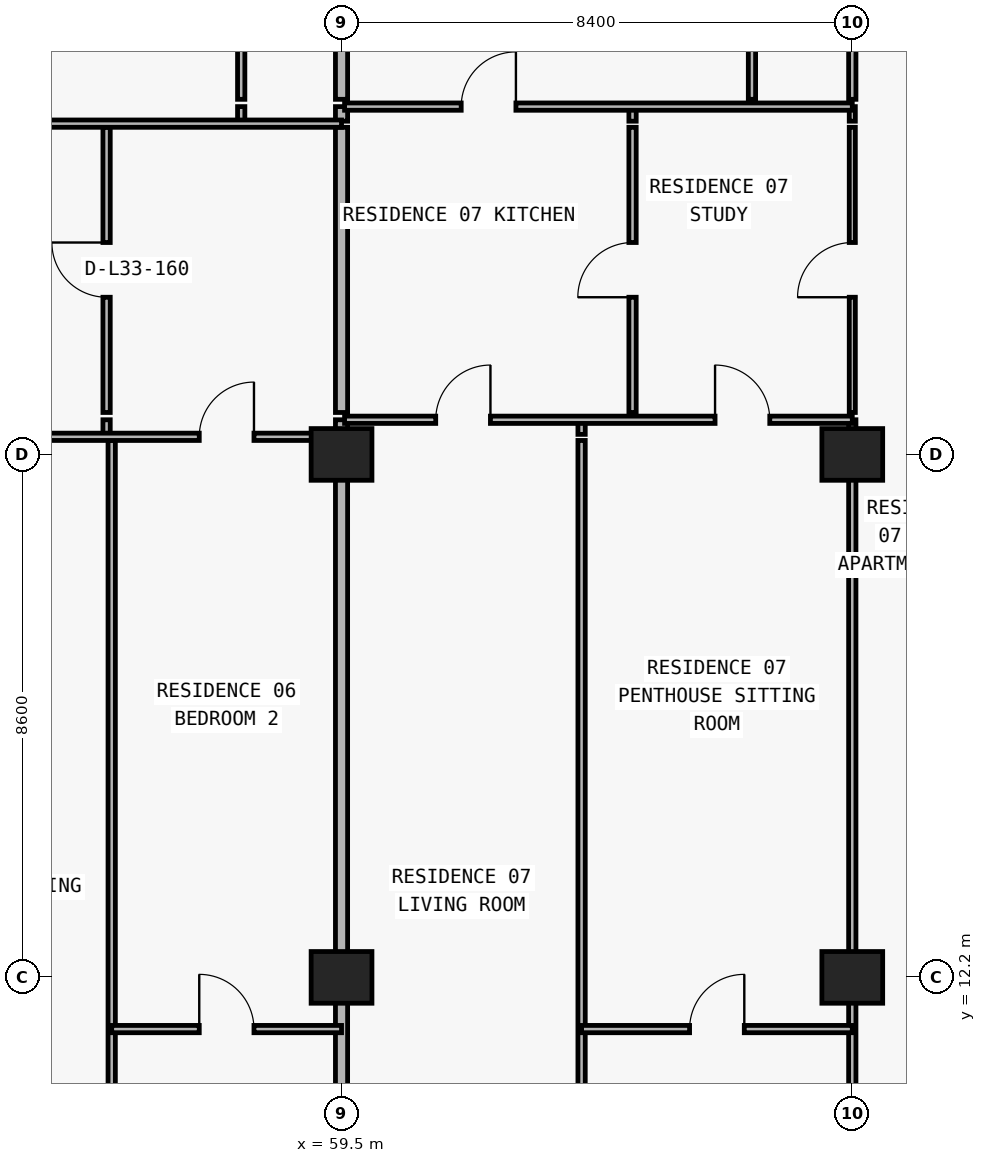
"""IFC4 building model, lengths in metres.
Left out: names, types, materials, properties, quantities, classifications, styles, units other than length and angle.
Written with IfcOpenShell. Run it as: python <this file> out.ifc"""

import sys

from ifc_helpers import new_model, si_unit, direction, frame, frame_2d, origin, origin_2d, place, context, subcontext, project, spatial, rectangle, extrude, element, fill, save


model = new_model("IFC4")
c1 = context("Model", 3, precision=1e-05, world=origin(), true_north=direction((0.0, 1.0)))
c2 = subcontext(c1, "Body", "Model", "MODEL_VIEW")
j1 = project(units=[si_unit("LENGTHUNIT", "METRE"), si_unit("PLANEANGLEUNIT", "RADIAN")], contexts=[c1])
p1 = place(None, origin())
s1 = spatial("IfcSite", under=j1, at=p1, CompositionType="ELEMENT")
p2 = place(p1, origin())
s2 = spatial("IfcBuilding", under=s1, at=p2, CompositionType="ELEMENT")
p3 = place(p2, frame((0.0, 0.0, 122.4)))
s3 = spatial("IfcBuildingStorey", under=s2, at=p3, CompositionType="ELEMENT", Elevation=122.4)
for number, where, z_axis, x_axis in (
    (1, (59.5, 12.2, 0.0), (0.0, 0.0, 1.0), (1.0, 0.0, 0.0)),
    (2, (67.9, 12.2, 0.0), (0.0, 0.0, 1.0), (1.0, 0.0, 0.0)),
    (3, (59.5, 20.8, 0.0), (0.0, 0.0, 1.0), (1.0, 0.0, 0.0)),
    (4, (67.9, 20.8, 0.0), (0.0, 0.0, 1.0), (1.0, 0.0, 0.0)),
):
    element("IfcColumn", number, at=place(p3, frame(where, z_axis=z_axis, x_axis=x_axis)), inside=s3, PredefinedType="COLUMN", context=c2, shape_type="SweptSolid", body=[
        extrude(rectangle(XDim=1.0, YDim=0.85, at=origin_2d()), origin(), (0.0, 0.0, 1.0), 3.05),
    ])
p4 = place(p3, frame((55.636, 21.13, 0.0), z_axis=(0.0, 0.0, 1.0), x_axis=(0.0, 1.0, 0.0)))
e5 = element("IfcWall", 5, at=p4, inside=s3, PredefinedType="PARTITIONING", context=c2, shape_type="SweptSolid", body=[
    extrude(rectangle(XDim=0.24, YDim=0.12, at=frame_2d((0.12, 0.0))), origin(), (0.0, 0.0, 1.0), 3.05),
])
p5 = place(p3, frame((55.636, 21.49, 0.0), z_axis=(0.0, 0.0, 1.0), x_axis=(0.0, 1.0, 0.0)))
e6 = element("IfcWall", 6, at=p5, inside=s3, PredefinedType="PARTITIONING", context=c2, shape_type="SweptSolid", body=[
    extrude(rectangle(XDim=4.69, YDim=0.12, at=frame_2d((2.345, 0.0))), origin(), (0.0, 0.0, 1.0), 3.05),
])
p6 = place(p5, frame((1.895, 0.0, 0.0)))
e7 = element("IfcOpeningElement", 7, at=p6, cuts=e6, PredefinedType="OPENING", context=c2, shape_type="SweptSolid", body=[
    extrude(rectangle(XDim=0.9, YDim=2.15, at=frame_2d((0.45, 1.075))), frame((0.0, 0.07, 0.0), z_axis=(0.0, -1.0, 0.0), x_axis=(1.0, 0.0, 0.0)), (0.0, 0.0, 1.0), 0.14),
])
p7 = place(p3, frame((55.72, 8.84, 0.0), z_axis=(0.0, 0.0, 1.0), x_axis=(0.0, 1.0, 0.0)))
e8 = element("IfcWall", 8, at=p7, inside=s3, PredefinedType="PARTITIONING", context=c2, shape_type="SweptSolid", body=[
    extrude(rectangle(XDim=12.19, YDim=0.12, at=frame_2d((6.095, 0.0))), origin(), (0.0, 0.0, 1.0), 3.05),
])
p8 = place(p3, frame((57.85, 26.28, 0.0), z_axis=(0.0, 0.0, 1.0), x_axis=(0.0, 1.0, 0.0)))
e9 = element("IfcWall", 9, at=p8, inside=s3, PredefinedType="PARTITIONING", context=c2, shape_type="SweptSolid", body=[
    extrude(rectangle(XDim=0.24, YDim=0.12, at=frame_2d((0.12, 0.0))), origin(), (0.0, 0.0, 1.0), 3.05),
])
p9 = place(p3, frame((57.85, 26.64, 0.0), z_axis=(0.0, 0.0, 1.0), x_axis=(0.0, 1.0, 0.0)))
e10 = element("IfcWall", 10, at=p9, inside=s3, PredefinedType="PARTITIONING", context=c2, shape_type="SweptSolid", body=[
    extrude(rectangle(XDim=8.06, YDim=0.12, at=frame_2d((4.03, 0.0))), origin(), (0.0, 0.0, 1.0), 3.05),
])
p10 = place(p9, frame((3.755, 0.0, 0.0)))
e11 = element("IfcOpeningElement", 11, at=p10, cuts=e10, PredefinedType="OPENING", context=c2, shape_type="SweptSolid", body=[
    extrude(rectangle(XDim=0.85, YDim=2.1, at=frame_2d((0.425, 1.05))), frame((0.0, 0.07, 0.0), z_axis=(0.0, -1.0, 0.0), x_axis=(1.0, 0.0, 0.0)), (0.0, 0.0, 1.0), 0.14),
])
p11 = place(p3, frame((59.5, 8.84, 0.0), z_axis=(0.0, 0.0, 1.0), x_axis=(0.0, 1.0, 0.0)))
e12 = element("IfcWall", 12, at=p11, inside=s3, PredefinedType="PARTITIONING", context=c2, shape_type="SweptSolid", body=[
    extrude(rectangle(XDim=12.19, YDim=0.2, at=frame_2d((6.095, 0.0))), origin(), (0.0, 0.0, 1.0), 2.174),
])
p12 = place(p3, frame((59.5, 21.13, 0.0), z_axis=(0.0, 0.0, 1.0), x_axis=(0.0, 1.0, 0.0)))
e13 = element("IfcWall", 13, at=p12, inside=s3, PredefinedType="PARTITIONING", context=c2, shape_type="SweptSolid", body=[
    extrude(rectangle(XDim=0.24, YDim=0.2, at=frame_2d((0.12, 0.0))), origin(), (0.0, 0.0, 1.0), 2.174),
])
p13 = place(p3, frame((59.5, 21.49, 0.0), z_axis=(0.0, 0.0, 1.0), x_axis=(0.0, 1.0, 0.0)))
e14 = element("IfcWall", 14, at=p13, inside=s3, PredefinedType="PARTITIONING", context=c2, shape_type="SweptSolid", body=[
    extrude(rectangle(XDim=4.69, YDim=0.2, at=frame_2d((2.345, 0.0))), origin(), (0.0, 0.0, 1.0), 2.174),
])
p14 = place(p3, frame((59.5, 26.28, 0.0), z_axis=(0.0, 0.0, 1.0), x_axis=(0.0, 1.0, 0.0)))
e15 = element("IfcWall", 15, at=p14, inside=s3, PredefinedType="PARTITIONING", context=c2, shape_type="SweptSolid", body=[
    extrude(rectangle(XDim=0.24, YDim=0.2, at=frame_2d((0.12, 0.0))), origin(), (0.0, 0.0, 1.0), 2.174),
])
p15 = place(p3, frame((59.5, 26.64, 0.0), z_axis=(0.0, 0.0, 1.0), x_axis=(0.0, 1.0, 0.0)))
e16 = element("IfcWall", 16, at=p15, inside=s3, PredefinedType="PARTITIONING", context=c2, shape_type="SweptSolid", body=[
    extrude(rectangle(XDim=8.06, YDim=0.2, at=frame_2d((4.03, 0.0))), origin(), (0.0, 0.0, 1.0), 2.174),
])
p16 = place(p3, frame((63.448, 8.84, 0.0), z_axis=(0.0, 0.0, 1.0), x_axis=(0.0, 1.0, 0.0)))
e17 = element("IfcWall", 17, at=p16, inside=s3, PredefinedType="PARTITIONING", context=c2, shape_type="SweptSolid", body=[
    extrude(rectangle(XDim=12.19, YDim=0.12, at=frame_2d((6.095, 0.0))), origin(), (0.0, 0.0, 1.0), 3.05),
])
p17 = place(p3, frame((63.448, 21.13, 0.0), z_axis=(0.0, 0.0, 1.0), x_axis=(0.0, 1.0, 0.0)))
e18 = element("IfcWall", 18, at=p17, inside=s3, PredefinedType="PARTITIONING", context=c2, shape_type="SweptSolid", body=[
    extrude(rectangle(XDim=0.24, YDim=0.12, at=frame_2d((0.12, 0.0))), origin(), (0.0, 0.0, 1.0), 3.05),
])
p18 = place(p3, frame((64.286, 21.49, 0.0), z_axis=(0.0, 0.0, 1.0), x_axis=(0.0, 1.0, 0.0)))
e19 = element("IfcWall", 19, at=p18, inside=s3, PredefinedType="PARTITIONING", context=c2, shape_type="SweptSolid", body=[
    extrude(rectangle(XDim=4.69, YDim=0.12, at=frame_2d((2.345, 0.0))), origin(), (0.0, 0.0, 1.0), 3.05),
])
p19 = place(p18, frame((1.895, 0.0, 0.0)))
e20 = element("IfcOpeningElement", 20, at=p19, cuts=e19, PredefinedType="OPENING", context=c2, shape_type="SweptSolid", body=[
    extrude(rectangle(XDim=0.9, YDim=2.15, at=frame_2d((0.45, 1.075))), frame((0.0, 0.07, 0.0), z_axis=(0.0, -1.0, 0.0), x_axis=(1.0, 0.0, 0.0)), (0.0, 0.0, 1.0), 0.14),
])
p20 = place(p3, frame((64.286, 26.28, 0.0), z_axis=(0.0, 0.0, 1.0), x_axis=(0.0, 1.0, 0.0)))
e21 = element("IfcWall", 21, at=p20, inside=s3, PredefinedType="PARTITIONING", context=c2, shape_type="SweptSolid", body=[
    extrude(rectangle(XDim=0.24, YDim=0.12, at=frame_2d((0.12, 0.0))), origin(), (0.0, 0.0, 1.0), 3.05),
])
p21 = place(p3, frame((66.25, 26.64, 0.0), z_axis=(0.0, 0.0, 1.0), x_axis=(0.0, 1.0, 0.0)))
e22 = element("IfcWall", 22, at=p21, inside=s3, PredefinedType="PARTITIONING", context=c2, shape_type="SweptSolid", body=[
    extrude(rectangle(XDim=8.06, YDim=0.12, at=frame_2d((4.03, 0.0))), origin(), (0.0, 0.0, 1.0), 3.05),
])
p22 = place(p21, frame((3.755, 0.0, 0.0)))
e23 = element("IfcOpeningElement", 23, at=p22, cuts=e22, PredefinedType="OPENING", context=c2, shape_type="SweptSolid", body=[
    extrude(rectangle(XDim=0.85, YDim=2.1, at=frame_2d((0.425, 1.05))), frame((0.0, 0.07, 0.0), z_axis=(0.0, -1.0, 0.0), x_axis=(1.0, 0.0, 0.0)), (0.0, 0.0, 1.0), 0.14),
])
p23 = place(p3, frame((67.9, 8.84, 0.0), z_axis=(0.0, 0.0, 1.0), x_axis=(0.0, 1.0, 0.0)))
e24 = element("IfcWall", 24, at=p23, inside=s3, PredefinedType="PARTITIONING", context=c2, shape_type="SweptSolid", body=[
    extrude(rectangle(XDim=12.19, YDim=0.12, at=frame_2d((6.095, 0.0))), origin(), (0.0, 0.0, 1.0), 2.174),
])
p24 = place(p3, frame((67.9, 21.13, 0.0), z_axis=(0.0, 0.0, 1.0), x_axis=(0.0, 1.0, 0.0)))
e25 = element("IfcWall", 25, at=p24, inside=s3, PredefinedType="PARTITIONING", context=c2, shape_type="SweptSolid", body=[
    extrude(rectangle(XDim=0.24, YDim=0.12, at=frame_2d((0.12, 0.0))), origin(), (0.0, 0.0, 1.0), 2.174),
])
p25 = place(p3, frame((67.9, 21.49, 0.0), z_axis=(0.0, 0.0, 1.0), x_axis=(0.0, 1.0, 0.0)))
e26 = element("IfcWall", 26, at=p25, inside=s3, PredefinedType="MOVABLE", context=c2, shape_type="SweptSolid", body=[
    extrude(rectangle(XDim=4.69, YDim=0.1, at=frame_2d((2.345, 0.0))), origin(), (0.0, 0.0, 1.0), 2.174),
])
p26 = place(p25, frame((1.895, 0.0, 0.0)))
e27 = element("IfcOpeningElement", 27, at=p26, cuts=e26, PredefinedType="OPENING", context=c2, shape_type="SweptSolid", body=[
    extrude(rectangle(XDim=0.9, YDim=2.124, at=frame_2d((0.45, 1.062))), frame((0.0, 0.06, 0.0), z_axis=(0.0, -1.0, 0.0), x_axis=(1.0, 0.0, 0.0)), (0.0, 0.0, 1.0), 0.12),
])
p27 = place(p3, frame((67.9, 26.28, 0.0), z_axis=(0.0, 0.0, 1.0), x_axis=(0.0, 1.0, 0.0)))
e28 = element("IfcWall", 28, at=p27, inside=s3, PredefinedType="MOVABLE", context=c2, shape_type="SweptSolid", body=[
    extrude(rectangle(XDim=0.24, YDim=0.1, at=frame_2d((0.12, 0.0))), origin(), (0.0, 0.0, 1.0), 2.174),
])
p28 = place(p3, frame((67.9, 26.64, 0.0), z_axis=(0.0, 0.0, 1.0), x_axis=(0.0, 1.0, 0.0)))
e29 = element("IfcWall", 29, at=p28, inside=s3, PredefinedType="PARTITIONING", context=c2, shape_type="SweptSolid", body=[
    extrude(rectangle(XDim=8.06, YDim=0.12, at=frame_2d((4.03, 0.0))), origin(), (0.0, 0.0, 1.0), 2.174),
])
p29 = place(p3, frame((55.72, 11.35, 0.0), z_axis=(0.0, 0.0, 1.0), x_axis=(1.0, 0.0, 0.0)))
e30 = element("IfcWall", 30, at=p29, inside=s3, PredefinedType="PARTITIONING", context=c2, shape_type="SweptSolid", body=[
    extrude(rectangle(XDim=3.78, YDim=0.12, at=frame_2d((1.89, 0.0))), origin(), (0.0, 0.0, 1.0), 3.05),
])
p30 = place(p29, frame((1.44, 0.0, 0.0)))
e31 = element("IfcOpeningElement", 31, at=p30, cuts=e30, PredefinedType="OPENING", context=c2, shape_type="SweptSolid", body=[
    extrude(rectangle(XDim=0.9, YDim=2.15, at=frame_2d((0.45, 1.075))), frame((0.0, 0.07, 0.0), z_axis=(0.0, -1.0, 0.0), x_axis=(1.0, 0.0, 0.0)), (0.0, 0.0, 1.0), 0.14),
])
p31 = place(p3, frame((63.448, 11.35, 0.0), z_axis=(0.0, 0.0, 1.0), x_axis=(1.0, 0.0, 0.0)))
e32 = element("IfcWall", 32, at=p31, inside=s3, PredefinedType="PARTITIONING", context=c2, shape_type="SweptSolid", body=[
    extrude(rectangle(XDim=4.452, YDim=0.12, at=frame_2d((2.226, 0.0))), origin(), (0.0, 0.0, 1.0), 3.05),
])
p32 = place(p31, frame((1.776, 0.0, 0.0)))
e33 = element("IfcOpeningElement", 33, at=p32, cuts=e32, PredefinedType="OPENING", context=c2, shape_type="SweptSolid", body=[
    extrude(rectangle(XDim=0.9, YDim=2.15, at=frame_2d((0.45, 1.075))), frame((0.0, 0.07, 0.0), z_axis=(0.0, -1.0, 0.0), x_axis=(1.0, 0.0, 0.0)), (0.0, 0.0, 1.0), 0.14),
])
p33 = place(p3, frame((51.32, 21.09, 0.0), z_axis=(0.0, 0.0, 1.0), x_axis=(1.0, 0.0, 0.0)))
e34 = element("IfcWall", 34, at=p33, inside=s3, PredefinedType="PARTITIONING", context=c2, shape_type="SweptSolid", body=[
    extrude(rectangle(XDim=8.18, YDim=0.12, at=frame_2d((4.09, 0.0))), origin(), (0.0, 0.0, 1.0), 2.174),
])
p34 = place(p33, frame((1.708, 0.0, 0.0)))
e35 = element("IfcOpeningElement", 35, at=p34, cuts=e34, PredefinedType="OPENING", context=c2, shape_type="SweptSolid", body=[
    extrude(rectangle(XDim=0.9, YDim=2.124, at=frame_2d((0.45, 1.062))), frame((0.0, 0.07, 0.0), z_axis=(0.0, -1.0, 0.0), x_axis=(1.0, 0.0, 0.0)), (0.0, 0.0, 1.0), 0.14),
])
p35 = place(p33, frame((5.84, 0.0, 0.0)))
e36 = element("IfcOpeningElement", 36, at=p35, cuts=e34, PredefinedType="OPENING", context=c2, shape_type="SweptSolid", body=[
    extrude(rectangle(XDim=0.9, YDim=2.124, at=frame_2d((0.45, 1.062))), frame((0.0, 0.07, 0.0), z_axis=(0.0, -1.0, 0.0), x_axis=(1.0, 0.0, 0.0)), (0.0, 0.0, 1.0), 0.14),
])
p36 = place(p3, frame((59.55, 21.37, 0.0), z_axis=(0.0, 0.0, 1.0), x_axis=(1.0, 0.0, 0.0)))
e37 = element("IfcWall", 37, at=p36, inside=s3, PredefinedType="PARTITIONING", context=c2, shape_type="SweptSolid", body=[
    extrude(rectangle(XDim=8.35, YDim=0.12, at=frame_2d((4.175, 0.0))), origin(), (0.0, 0.0, 1.0), 3.05),
])
p37 = place(p36, frame((1.499, 0.0, 0.0)))
e38 = element("IfcOpeningElement", 38, at=p37, cuts=e37, PredefinedType="OPENING", context=c2, shape_type="SweptSolid", body=[
    extrude(rectangle(XDim=0.9, YDim=2.15, at=frame_2d((0.45, 1.075))), frame((0.0, 0.07, 0.0), z_axis=(0.0, -1.0, 0.0), x_axis=(1.0, 0.0, 0.0)), (0.0, 0.0, 1.0), 0.14),
])
p38 = place(p36, frame((6.093, 0.0, 0.0)))
e39 = element("IfcOpeningElement", 39, at=p38, cuts=e37, PredefinedType="OPENING", context=c2, shape_type="SweptSolid", body=[
    extrude(rectangle(XDim=0.9, YDim=2.15, at=frame_2d((0.45, 1.075))), frame((0.0, 0.07, 0.0), z_axis=(0.0, -1.0, 0.0), x_axis=(1.0, 0.0, 0.0)), (0.0, 0.0, 1.0), 0.14),
])
p39 = place(p3, frame((51.32, 26.24, 0.0), z_axis=(0.0, 0.0, 1.0), x_axis=(1.0, 0.0, 0.0)))
e40 = element("IfcWall", 40, at=p39, inside=s3, PredefinedType="PARTITIONING", context=c2, shape_type="SweptSolid", body=[
    extrude(rectangle(XDim=8.18, YDim=0.12, at=frame_2d((4.09, 0.0))), origin(), (0.0, 0.0, 1.0), 3.05),
])
p40 = place(p39, frame((1.708, 0.0, 0.0)))
e41 = element("IfcOpeningElement", 41, at=p40, cuts=e40, PredefinedType="OPENING", context=c2, shape_type="SweptSolid", body=[
    extrude(rectangle(XDim=0.9, YDim=2.15, at=frame_2d((0.45, 1.075))), frame((0.0, 0.07, 0.0), z_axis=(0.0, -1.0, 0.0), x_axis=(1.0, 0.0, 0.0)), (0.0, 0.0, 1.0), 0.14),
])
p41 = place(p3, frame((59.55, 26.52, 0.0), z_axis=(0.0, 0.0, 1.0), x_axis=(1.0, 0.0, 0.0)))
e42 = element("IfcWall", 42, at=p41, inside=s3, PredefinedType="PARTITIONING", context=c2, shape_type="SweptSolid", body=[
    extrude(rectangle(XDim=8.35, YDim=0.12, at=frame_2d((4.175, 0.0))), origin(), (0.0, 0.0, 1.0), 3.05),
])
p42 = place(p41, frame((1.918, 0.0, 0.0)))
e43 = element("IfcOpeningElement", 43, at=p42, cuts=e42, PredefinedType="OPENING", context=c2, shape_type="SweptSolid", body=[
    extrude(rectangle(XDim=0.9, YDim=2.15, at=frame_2d((0.45, 1.075))), frame((0.0, 0.07, 0.0), z_axis=(0.0, -1.0, 0.0), x_axis=(1.0, 0.0, 0.0)), (0.0, 0.0, 1.0), 0.14),
])
p43 = place(p6, origin())
e44 = element("IfcDoor", 44, at=p43, inside=s3, OperationType="SINGLE_SWING_RIGHT", PredefinedType="DOOR", context=c2, shape_type="SweptSolid", body=[
    extrude(rectangle(XDim=0.9, YDim=2.15, at=frame_2d((0.45, 1.075))), frame((0.0, 0.025, 0.0), z_axis=(0.0, -1.0, 0.0), x_axis=(1.0, 0.0, 0.0)), (0.0, 0.0, 1.0), 0.05),
])
fill(e7, e44)
p44 = place(p35, origin())
e45 = element("IfcDoor", 45, at=p44, inside=s3, OperationType="SINGLE_SWING_RIGHT", PredefinedType="DOOR", context=c2, shape_type="SweptSolid", body=[
    extrude(rectangle(XDim=0.9, YDim=2.124, at=frame_2d((0.45, 1.062))), frame((0.0, 0.025, 0.0), z_axis=(0.0, -1.0, 0.0), x_axis=(1.0, 0.0, 0.0)), (0.0, 0.0, 1.0), 0.05),
])
fill(e36, e45)
p45 = place(p30, origin())
e46 = element("IfcDoor", 46, at=p45, inside=s3, OperationType="SINGLE_SWING_LEFT", PredefinedType="DOOR", context=c2, shape_type="SweptSolid", body=[
    extrude(rectangle(XDim=0.9, YDim=2.15, at=frame_2d((0.45, 1.075))), frame((0.0, 0.025, 0.0), z_axis=(0.0, -1.0, 0.0), x_axis=(1.0, 0.0, 0.0)), (0.0, 0.0, 1.0), 0.05),
])
fill(e31, e46)
p46 = place(p42, origin())
e47 = element("IfcDoor", 47, at=p46, inside=s3, OperationType="SINGLE_SWING_RIGHT", PredefinedType="DOOR", context=c2, shape_type="SweptSolid", body=[
    extrude(rectangle(XDim=0.9, YDim=2.15, at=frame_2d((0.45, 1.075))), frame((0.0, 0.025, 0.0), z_axis=(0.0, -1.0, 0.0), x_axis=(1.0, 0.0, 0.0)), (0.0, 0.0, 1.0), 0.05),
])
fill(e43, e47)
p47 = place(p19, origin())
e48 = element("IfcDoor", 48, at=p47, inside=s3, OperationType="SINGLE_SWING_LEFT", PredefinedType="DOOR", context=c2, shape_type="SweptSolid", body=[
    extrude(rectangle(XDim=0.9, YDim=2.15, at=frame_2d((0.45, 1.075))), frame((0.0, 0.025, 0.0), z_axis=(0.0, -1.0, 0.0), x_axis=(1.0, 0.0, 0.0)), (0.0, 0.0, 1.0), 0.05),
])
fill(e20, e48)
p48 = place(p37, origin())
e49 = element("IfcDoor", 49, at=p48, inside=s3, OperationType="SINGLE_SWING_RIGHT", PredefinedType="DOOR", context=c2, shape_type="SweptSolid", body=[
    extrude(rectangle(XDim=0.9, YDim=2.15, at=frame_2d((0.45, 1.075))), frame((0.0, 0.025, 0.0), z_axis=(0.0, -1.0, 0.0), x_axis=(1.0, 0.0, 0.0)), (0.0, 0.0, 1.0), 0.05),
])
fill(e38, e49)
p49 = place(p38, origin())
e50 = element("IfcDoor", 50, at=p49, inside=s3, OperationType="SINGLE_SWING_LEFT", PredefinedType="DOOR", context=c2, shape_type="SweptSolid", body=[
    extrude(rectangle(XDim=0.9, YDim=2.15, at=frame_2d((0.45, 1.075))), frame((0.0, 0.025, 0.0), z_axis=(0.0, -1.0, 0.0), x_axis=(1.0, 0.0, 0.0)), (0.0, 0.0, 1.0), 0.05),
])
fill(e39, e50)
p50 = place(p32, origin())
e51 = element("IfcDoor", 51, at=p50, inside=s3, OperationType="SINGLE_SWING_RIGHT", PredefinedType="DOOR", context=c2, shape_type="SweptSolid", body=[
    extrude(rectangle(XDim=0.9, YDim=2.15, at=frame_2d((0.45, 1.075))), frame((0.0, 0.025, 0.0), z_axis=(0.0, -1.0, 0.0), x_axis=(1.0, 0.0, 0.0)), (0.0, 0.0, 1.0), 0.05),
])
fill(e33, e51)
p51 = place(p26, origin())
e52 = element("IfcDoor", 52, at=p51, inside=s3, OperationType="SINGLE_SWING_LEFT", PredefinedType="DOOR", context=c2, shape_type="SweptSolid", body=[
    extrude(rectangle(XDim=0.9, YDim=2.124, at=frame_2d((0.45, 1.062))), frame((0.0, 0.025, 0.0), z_axis=(0.0, -1.0, 0.0), x_axis=(1.0, 0.0, 0.0)), (0.0, 0.0, 1.0), 0.05),
])
fill(e27, e52)
save(model, sys.argv[1])
